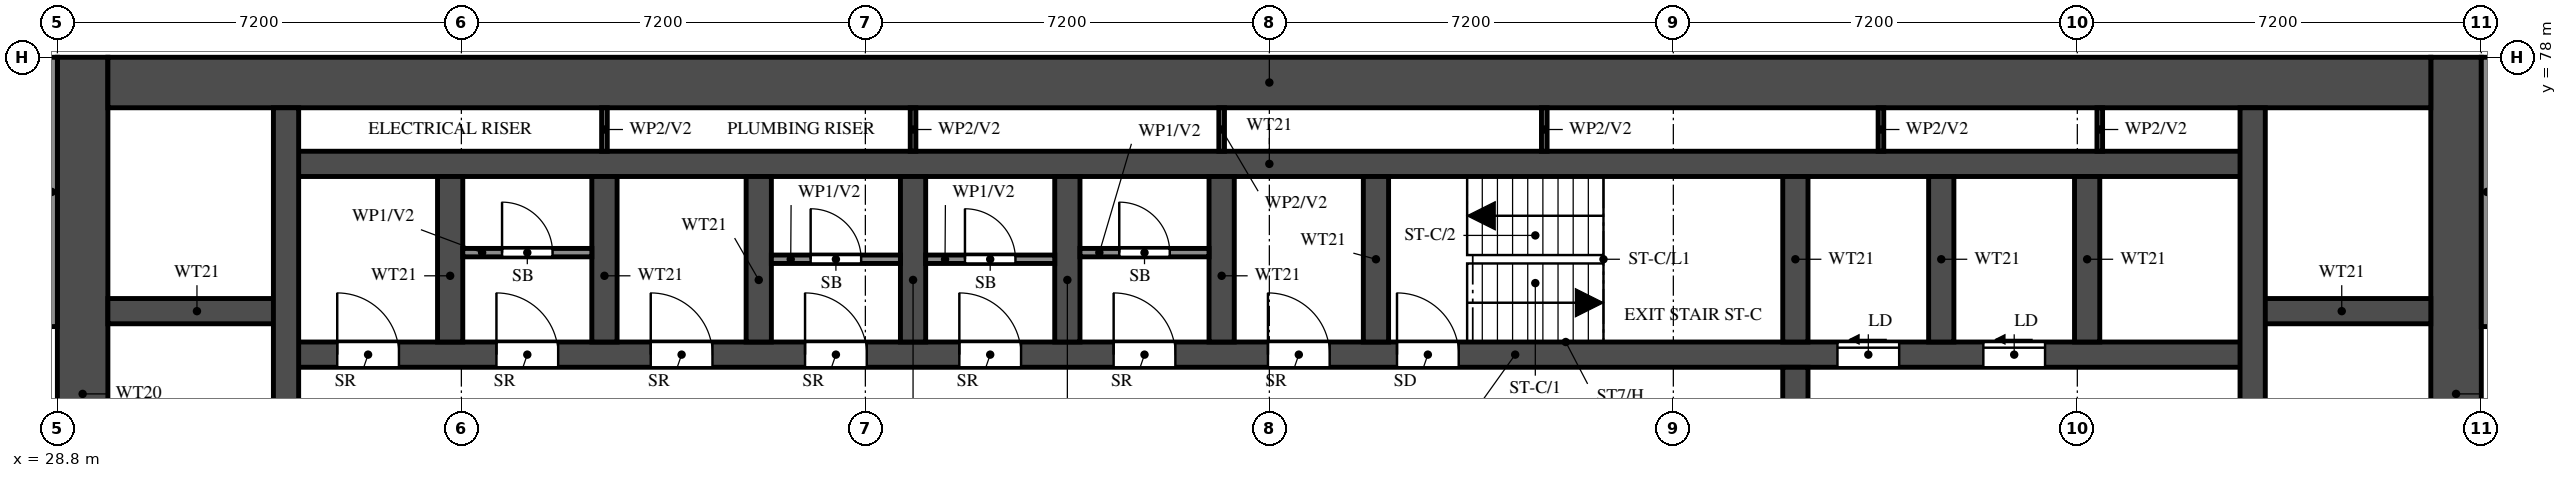
"""IFC4 building model, lengths in metres.
Left out: names, types, materials, properties, quantities, classifications, styles, units other than length and angle.
Written with IfcOpenShell. Run it as: python <this file> out.ifc"""

import sys

from ifc_helpers import new_model, si_unit, direction, frame, frame_2d, origin, place, context, subcontext, project, spatial, rectangle, extrude, element, fill, save


model = new_model("IFC4")
c1 = context("Model", 3, precision=1e-05, world=origin(), true_north=direction((0.0, 1.0)))
c2 = subcontext(c1, "Body", "Model", "MODEL_VIEW")
j1 = project(units=[si_unit("LENGTHUNIT", "METRE"), si_unit("PLANEANGLEUNIT", "RADIAN")], contexts=[c1])
p1 = place(None, origin())
s1 = spatial("IfcSite", under=j1, at=p1, CompositionType="ELEMENT")
p2 = place(p1, origin())
s2 = spatial("IfcBuilding", under=s1, at=p2, CompositionType="ELEMENT")
p3 = place(p2, frame((0.0, 0.0, 37.5)))
s3 = spatial("IfcBuildingStorey", under=s2, at=p3, CompositionType="ELEMENT", Elevation=37.5)
for number, where, z_axis, x_axis in (
    (1, (29.25, 66.0, 0.0), (0.0, 0.0, 1.0), (0.0, 1.0, 0.0)),
    (2, (71.55, 66.0, 0.0), (0.0, 0.0, 1.0), (0.0, 1.0, 0.0)),
):
    element("IfcWall", number, at=place(p3, frame(where, z_axis=z_axis, x_axis=x_axis)), inside=s3, PredefinedType="SHEAR", context=c2, shape_type="SweptSolid", body=[
        extrude(rectangle(XDim=12.0, YDim=0.9, at=frame_2d((6.0, 0.0))), origin(), (0.0, 0.0, 1.0), 3.18),
    ])
p4 = place(p3, frame((29.7, 77.55, 0.0), z_axis=(0.0, 0.0, 1.0), x_axis=(1.0, 0.0, 0.0)))
e3 = element("IfcWall", 3, at=p4, inside=s3, PredefinedType="SHEAR", context=c2, shape_type="SweptSolid", body=[
    extrude(rectangle(XDim=41.4, YDim=0.9, at=frame_2d((20.7, 0.0))), origin(), (0.0, 0.0, 1.0), 3.18),
])
p5 = place(p3, frame((32.875, 72.7, 0.0), z_axis=(0.0, 0.0, 1.0), x_axis=(1.0, 0.0, 0.0)))
e4 = element("IfcWall", 4, at=p5, inside=s3, PredefinedType="SHEAR", context=c2, shape_type="SweptSolid", body=[
    extrude(rectangle(XDim=35.05, YDim=0.45, at=frame_2d((17.525, 0.0))), origin(), (0.0, 0.0, 1.0), 3.18),
])
p6 = place(p5, frame((19.8, 0.0, 0.0)))
e5 = element("IfcOpeningElement", 5, at=p6, cuts=e4, PredefinedType="OPENING", context=c2, shape_type="SweptSolid", body=[
    extrude(rectangle(XDim=1.1, YDim=2.1, at=frame_2d((0.55, 1.05))), frame((0.0, 0.235, 0.0), z_axis=(0.0, -1.0, 0.0), x_axis=(1.0, 0.0, 0.0)), (0.0, 0.0, 1.0), 0.47),
])
p7 = place(p5, frame((27.65, 0.0, 0.0)))
e6 = element("IfcOpeningElement", 6, at=p7, cuts=e4, PredefinedType="OPENING", context=c2, shape_type="SweptSolid", body=[
    extrude(rectangle(XDim=1.1, YDim=2.1, at=frame_2d((0.55, 1.05))), frame((0.0, 0.235, 0.0), z_axis=(0.0, -1.0, 0.0), x_axis=(1.0, 0.0, 0.0)), (0.0, 0.0, 1.0), 0.47),
])
p8 = place(p5, frame((30.25, 0.0, 0.0)))
e7 = element("IfcOpeningElement", 7, at=p8, cuts=e4, PredefinedType="OPENING", context=c2, shape_type="SweptSolid", body=[
    extrude(rectangle(XDim=1.1, YDim=2.1, at=frame_2d((0.55, 1.05))), frame((0.0, 0.235, 0.0), z_axis=(0.0, -1.0, 0.0), x_axis=(1.0, 0.0, 0.0)), (0.0, 0.0, 1.0), 0.47),
])
p9 = place(p5, frame((3.75, 0.0, 0.0)))
e8 = element("IfcOpeningElement", 8, at=p9, cuts=e4, PredefinedType="OPENING", context=c2, shape_type="SweptSolid", body=[
    extrude(rectangle(XDim=1.1, YDim=2.1, at=frame_2d((0.55, 1.05))), frame((0.0, 0.235, 0.0), z_axis=(0.0, -1.0, 0.0), x_axis=(1.0, 0.0, 0.0)), (0.0, 0.0, 1.0), 0.47),
])
p10 = place(p5, frame((6.5, 0.0, 0.0)))
e9 = element("IfcOpeningElement", 9, at=p10, cuts=e4, PredefinedType="OPENING", context=c2, shape_type="SweptSolid", body=[
    extrude(rectangle(XDim=1.1, YDim=2.1, at=frame_2d((0.55, 1.05))), frame((0.0, 0.235, 0.0), z_axis=(0.0, -1.0, 0.0), x_axis=(1.0, 0.0, 0.0)), (0.0, 0.0, 1.0), 0.47),
])
p11 = place(p5, frame((9.25, 0.0, 0.0)))
e10 = element("IfcOpeningElement", 10, at=p11, cuts=e4, PredefinedType="OPENING", context=c2, shape_type="SweptSolid", body=[
    extrude(rectangle(XDim=1.1, YDim=2.1, at=frame_2d((0.55, 1.05))), frame((0.0, 0.235, 0.0), z_axis=(0.0, -1.0, 0.0), x_axis=(1.0, 0.0, 0.0)), (0.0, 0.0, 1.0), 0.47),
])
p12 = place(p5, frame((12.0, 0.0, 0.0)))
e11 = element("IfcOpeningElement", 11, at=p12, cuts=e4, PredefinedType="OPENING", context=c2, shape_type="SweptSolid", body=[
    extrude(rectangle(XDim=1.1, YDim=2.1, at=frame_2d((0.55, 1.05))), frame((0.0, 0.235, 0.0), z_axis=(0.0, -1.0, 0.0), x_axis=(1.0, 0.0, 0.0)), (0.0, 0.0, 1.0), 0.47),
])
p13 = place(p5, frame((14.75, 0.0, 0.0)))
e12 = element("IfcOpeningElement", 12, at=p13, cuts=e4, PredefinedType="OPENING", context=c2, shape_type="SweptSolid", body=[
    extrude(rectangle(XDim=1.1, YDim=2.1, at=frame_2d((0.55, 1.05))), frame((0.0, 0.235, 0.0), z_axis=(0.0, -1.0, 0.0), x_axis=(1.0, 0.0, 0.0)), (0.0, 0.0, 1.0), 0.47),
])
p14 = place(p5, frame((17.5, 0.0, 0.0)))
e13 = element("IfcOpeningElement", 13, at=p14, cuts=e4, PredefinedType="OPENING", context=c2, shape_type="SweptSolid", body=[
    extrude(rectangle(XDim=1.1, YDim=2.1, at=frame_2d((0.55, 1.05))), frame((0.0, 0.235, 0.0), z_axis=(0.0, -1.0, 0.0), x_axis=(1.0, 0.0, 0.0)), (0.0, 0.0, 1.0), 0.47),
])
p15 = place(p5, frame((0.913, 0.0, 0.0)))
e14 = element("IfcOpeningElement", 14, at=p15, cuts=e4, PredefinedType="OPENING", context=c2, shape_type="SweptSolid", body=[
    extrude(rectangle(XDim=1.1, YDim=2.1, at=frame_2d((0.55, 1.05))), frame((0.0, 0.235, 0.0), z_axis=(0.0, -1.0, 0.0), x_axis=(1.0, 0.0, 0.0)), (0.0, 0.0, 1.0), 0.47),
])
p16 = place(p3, frame((32.875, 76.1, 0.0), z_axis=(0.0, 0.0, 1.0), x_axis=(1.0, 0.0, 0.0)))
e15 = element("IfcWall", 15, at=p16, inside=s3, PredefinedType="SHEAR", context=c2, shape_type="SweptSolid", body=[
    extrude(rectangle(XDim=35.05, YDim=0.45, at=frame_2d((17.525, 0.0))), origin(), (0.0, 0.0, 1.0), 3.18),
])
for number, where, z_axis, x_axis in (
    (16, (29.7, 73.475, 0.0), (0.0, 0.0, 1.0), (1.0, 0.0, 0.0)),
    (17, (67.925, 73.475, 0.0), (0.0, 0.0, 1.0), (1.0, 0.0, 0.0)),
):
    element("IfcWall", number, at=place(p3, frame(where, z_axis=z_axis, x_axis=x_axis)), inside=s3, PredefinedType="SHEAR", context=c2, shape_type="SweptSolid", body=[
        extrude(rectangle(XDim=3.175, YDim=0.45, at=frame_2d((1.587, 0.0))), origin(), (0.0, 0.0, 1.0), 3.18),
    ])
p17 = place(p3, frame((32.875, 66.45, 0.0), z_axis=(0.0, 0.0, 1.0), x_axis=(0.0, 1.0, 0.0)))
e18 = element("IfcWall", 18, at=p17, inside=s3, PredefinedType="SHEAR", context=c2, shape_type="SweptSolid", body=[
    extrude(rectangle(XDim=10.65, YDim=0.45, at=frame_2d((5.325, 0.0))), origin(), (0.0, 0.0, 1.0), 3.18),
])
p18 = place(p3, frame((67.925, 66.45, 0.0), z_axis=(0.0, 0.0, 1.0), x_axis=(0.0, 1.0, 0.0)))
e19 = element("IfcWall", 19, at=p18, inside=s3, PredefinedType="SHEAR", context=c2, shape_type="SweptSolid", body=[
    extrude(rectangle(XDim=10.65, YDim=0.45, at=frame_2d((5.325, 0.0))), origin(), (0.0, 0.0, 1.0), 3.18),
])
p19 = place(p18, frame((0.15, 0.0, 0.0)))
e20 = element("IfcOpeningElement", 20, at=p19, cuts=e19, PredefinedType="OPENING", context=c2, shape_type="SweptSolid", body=[
    extrude(rectangle(XDim=1.1, YDim=2.1, at=frame_2d((0.55, 1.05))), frame((0.0, 0.235, 0.0), z_axis=(0.0, -1.0, 0.0), x_axis=(1.0, 0.0, 0.0)), (0.0, 0.0, 1.0), 0.47),
])
p20 = place(p3, frame((59.775, 66.45, 0.0), z_axis=(0.0, 0.0, 1.0), x_axis=(0.0, 1.0, 0.0)))
e21 = element("IfcWall", 21, at=p20, inside=s3, PredefinedType="SHEAR", context=c2, shape_type="SweptSolid", body=[
    extrude(rectangle(XDim=6.025, YDim=0.45, at=frame_2d((3.013, 0.0))), origin(), (0.0, 0.0, 1.0), 3.18),
])
p21 = place(p20, frame((3.85, 0.0, 0.0)))
e22 = element("IfcOpeningElement", 22, at=p21, cuts=e21, PredefinedType="OPENING", context=c2, shape_type="SweptSolid", body=[
    extrude(rectangle(XDim=1.2, YDim=2.1, at=frame_2d((0.6, 1.05))), frame((0.0, 0.235, 0.0), z_axis=(0.0, -1.0, 0.0), x_axis=(1.0, 0.0, 0.0)), (0.0, 0.0, 1.0), 0.47),
])
for number, where, z_axis, x_axis in (
    (23, (59.775, 72.925, 0.0), (0.0, 0.0, 1.0), (0.0, 1.0, 0.0)),
    (24, (35.8, 72.925, 0.0), (0.0, 0.0, 1.0), (0.0, 1.0, 0.0)),
    (25, (38.55, 72.925, 0.0), (0.0, 0.0, 1.0), (0.0, 1.0, 0.0)),
    (26, (41.3, 72.925, 0.0), (0.0, 0.0, 1.0), (0.0, 1.0, 0.0)),
    (27, (44.05, 72.925, 0.0), (0.0, 0.0, 1.0), (0.0, 1.0, 0.0)),
    (28, (46.8, 72.925, 0.0), (0.0, 0.0, 1.0), (0.0, 1.0, 0.0)),
    (29, (49.55, 72.925, 0.0), (0.0, 0.0, 1.0), (0.0, 1.0, 0.0)),
    (30, (52.3, 72.925, 0.0), (0.0, 0.0, 1.0), (0.0, 1.0, 0.0)),
    (31, (62.375, 72.925, 0.0), (0.0, 0.0, 1.0), (0.0, 1.0, 0.0)),
    (32, (64.975, 72.925, 0.0), (0.0, 0.0, 1.0), (0.0, 1.0, 0.0)),
):
    element("IfcWall", number, at=place(p3, frame(where, z_axis=z_axis, x_axis=x_axis)), inside=s3, PredefinedType="SHEAR", context=c2, shape_type="SweptSolid", body=[
        extrude(rectangle(XDim=2.95, YDim=0.45, at=frame_2d((1.475, 0.0))), origin(), (0.0, 0.0, 1.0), 3.18),
    ])
p22 = place(p3, frame((36.025, 74.518, 0.0), z_axis=(0.0, 0.0, 1.0), x_axis=(1.0, 0.0, 0.0)))
e33 = element("IfcWall", 33, at=p22, inside=s3, PredefinedType="PARTITIONING", context=c2, shape_type="SweptSolid", body=[
    extrude(rectangle(XDim=2.3, YDim=0.15, at=frame_2d((1.15, 0.0))), origin(), (0.0, 0.0, 1.0), 3.18),
])
p23 = place(p22, frame((0.7, 0.0, 0.0)))
e34 = element("IfcOpeningElement", 34, at=p23, cuts=e33, PredefinedType="OPENING", context=c2, shape_type="SweptSolid", body=[
    extrude(rectangle(XDim=0.9, YDim=2.1, at=frame_2d((0.45, 1.05))), frame((0.0, 0.085, 0.0), z_axis=(0.0, -1.0, 0.0), x_axis=(1.0, 0.0, 0.0)), (0.0, 0.0, 1.0), 0.17),
])
p24 = place(p3, frame((41.525, 74.4, 0.0), z_axis=(0.0, 0.0, 1.0), x_axis=(1.0, 0.0, 0.0)))
e35 = element("IfcWall", 35, at=p24, inside=s3, PredefinedType="PARTITIONING", context=c2, shape_type="SweptSolid", body=[
    extrude(rectangle(XDim=2.3, YDim=0.15, at=frame_2d((1.15, 0.0))), origin(), (0.0, 0.0, 1.0), 3.18),
])
p25 = place(p24, frame((0.7, 0.0, 0.0)))
e36 = element("IfcOpeningElement", 36, at=p25, cuts=e35, PredefinedType="OPENING", context=c2, shape_type="SweptSolid", body=[
    extrude(rectangle(XDim=0.9, YDim=2.1, at=frame_2d((0.45, 1.05))), frame((0.0, 0.085, 0.0), z_axis=(0.0, -1.0, 0.0), x_axis=(1.0, 0.0, 0.0)), (0.0, 0.0, 1.0), 0.17),
])
p26 = place(p3, frame((44.275, 74.4, 0.0), z_axis=(0.0, 0.0, 1.0), x_axis=(1.0, 0.0, 0.0)))
e37 = element("IfcWall", 37, at=p26, inside=s3, PredefinedType="PARTITIONING", context=c2, shape_type="SweptSolid", body=[
    extrude(rectangle(XDim=2.3, YDim=0.15, at=frame_2d((1.15, 0.0))), origin(), (0.0, 0.0, 1.0), 3.18),
])
p27 = place(p26, frame((0.7, 0.0, 0.0)))
e38 = element("IfcOpeningElement", 38, at=p27, cuts=e37, PredefinedType="OPENING", context=c2, shape_type="SweptSolid", body=[
    extrude(rectangle(XDim=0.9, YDim=2.1, at=frame_2d((0.45, 1.05))), frame((0.0, 0.085, 0.0), z_axis=(0.0, -1.0, 0.0), x_axis=(1.0, 0.0, 0.0)), (0.0, 0.0, 1.0), 0.17),
])
p28 = place(p3, frame((47.025, 74.518, 0.0), z_axis=(0.0, 0.0, 1.0), x_axis=(1.0, 0.0, 0.0)))
e39 = element("IfcWall", 39, at=p28, inside=s3, PredefinedType="PARTITIONING", context=c2, shape_type="SweptSolid", body=[
    extrude(rectangle(XDim=2.3, YDim=0.15, at=frame_2d((1.15, 0.0))), origin(), (0.0, 0.0, 1.0), 3.18),
])
p29 = place(p28, frame((0.7, 0.0, 0.0)))
e40 = element("IfcOpeningElement", 40, at=p29, cuts=e39, PredefinedType="OPENING", context=c2, shape_type="SweptSolid", body=[
    extrude(rectangle(XDim=0.9, YDim=2.1, at=frame_2d((0.45, 1.05))), frame((0.0, 0.085, 0.0), z_axis=(0.0, -1.0, 0.0), x_axis=(1.0, 0.0, 0.0)), (0.0, 0.0, 1.0), 0.17),
])
for number, where, z_axis, x_axis in (
    (41, (38.55, 76.325, 0.0), (0.0, 0.0, 1.0), (0.0, 1.0, 0.0)),
    (42, (44.05, 76.325, 0.0), (0.0, 0.0, 1.0), (0.0, 1.0, 0.0)),
    (43, (49.55, 76.325, 0.0), (0.0, 0.0, 1.0), (0.0, 1.0, 0.0)),
    (44, (55.3, 76.325, 0.0), (0.0, 0.0, 1.0), (0.0, 1.0, 0.0)),
    (45, (61.3, 76.325, 0.0), (0.0, 0.0, 1.0), (0.0, 1.0, 0.0)),
    (46, (65.2, 76.325, 0.0), (0.0, 0.0, 1.0), (0.0, 1.0, 0.0)),
):
    element("IfcWall", number, at=place(p3, frame(where, z_axis=z_axis, x_axis=x_axis)), inside=s3, PredefinedType="PARTITIONING", context=c2, shape_type="SweptSolid", body=[
        extrude(rectangle(XDim=0.775, YDim=0.1, at=frame_2d((0.388, 0.0))), origin(), (0.0, 0.0, 1.0), 3.18),
    ])
for number, where, z_axis, x_axis in (
    (47, (28.7, 73.2, 0.0), (0.0, 0.0, 1.0), (0.0, 1.0, 0.0)),
    (48, (72.1, 73.2, 0.0), (0.0, 0.0, 1.0), (0.0, 1.0, 0.0)),
):
    element("IfcWall", number, at=place(p3, frame(where, z_axis=z_axis, x_axis=x_axis)), inside=s3, PredefinedType="SOLIDWALL", context=c2, shape_type="SweptSolid", body=[
        extrude(rectangle(XDim=4.8, YDim=0.2, at=frame_2d((2.4, 0.0))), origin(), (0.0, 0.0, 1.0), 3.18),
    ])
p30 = place(p6, origin())
e49 = element("IfcDoor", 49, at=p30, inside=s3, OperationType="SINGLE_SWING_LEFT", PredefinedType="DOOR", context=c2, shape_type="SweptSolid", body=[
    extrude(rectangle(XDim=1.1, YDim=2.1, at=frame_2d((0.55, 1.05))), frame((0.0, 0.025, 0.0), z_axis=(0.0, -1.0, 0.0), x_axis=(1.0, 0.0, 0.0)), (0.0, 0.0, 1.0), 0.05),
])
fill(e5, e49)
p31 = place(p7, origin())
e50 = element("IfcDoor", 50, at=p31, inside=s3, OperationType="SLIDING_TO_LEFT", PredefinedType="DOOR", context=c2, shape_type="SweptSolid", body=[
    extrude(rectangle(XDim=1.1, YDim=2.1, at=frame_2d((0.55, 1.05))), frame((0.0, 0.025, 0.0), z_axis=(0.0, -1.0, 0.0), x_axis=(1.0, 0.0, 0.0)), (0.0, 0.0, 1.0), 0.05),
])
fill(e6, e50)
p32 = place(p8, origin())
e51 = element("IfcDoor", 51, at=p32, inside=s3, OperationType="SLIDING_TO_LEFT", PredefinedType="DOOR", context=c2, shape_type="SweptSolid", body=[
    extrude(rectangle(XDim=1.1, YDim=2.1, at=frame_2d((0.55, 1.05))), frame((0.0, 0.025, 0.0), z_axis=(0.0, -1.0, 0.0), x_axis=(1.0, 0.0, 0.0)), (0.0, 0.0, 1.0), 0.05),
])
fill(e7, e51)
p33 = place(p9, origin())
e52 = element("IfcDoor", 52, at=p33, inside=s3, OperationType="SINGLE_SWING_LEFT", PredefinedType="DOOR", context=c2, shape_type="SweptSolid", body=[
    extrude(rectangle(XDim=1.1, YDim=2.1, at=frame_2d((0.55, 1.05))), frame((0.0, 0.025, 0.0), z_axis=(0.0, -1.0, 0.0), x_axis=(1.0, 0.0, 0.0)), (0.0, 0.0, 1.0), 0.05),
])
fill(e8, e52)
p34 = place(p23, origin())
e53 = element("IfcDoor", 53, at=p34, inside=s3, OperationType="SINGLE_SWING_RIGHT", PredefinedType="DOOR", context=c2, shape_type="SweptSolid", body=[
    extrude(rectangle(XDim=0.9, YDim=2.1, at=frame_2d((0.45, 1.05))), frame((0.0, 0.025, 0.0), z_axis=(0.0, -1.0, 0.0), x_axis=(1.0, 0.0, 0.0)), (0.0, 0.0, 1.0), 0.05),
])
fill(e34, e53)
p35 = place(p10, origin())
e54 = element("IfcDoor", 54, at=p35, inside=s3, OperationType="SINGLE_SWING_LEFT", PredefinedType="DOOR", context=c2, shape_type="SweptSolid", body=[
    extrude(rectangle(XDim=1.1, YDim=2.1, at=frame_2d((0.55, 1.05))), frame((0.0, 0.025, 0.0), z_axis=(0.0, -1.0, 0.0), x_axis=(1.0, 0.0, 0.0)), (0.0, 0.0, 1.0), 0.05),
])
fill(e9, e54)
p36 = place(p11, origin())
e55 = element("IfcDoor", 55, at=p36, inside=s3, OperationType="SINGLE_SWING_LEFT", PredefinedType="DOOR", context=c2, shape_type="SweptSolid", body=[
    extrude(rectangle(XDim=1.1, YDim=2.1, at=frame_2d((0.55, 1.05))), frame((0.0, 0.025, 0.0), z_axis=(0.0, -1.0, 0.0), x_axis=(1.0, 0.0, 0.0)), (0.0, 0.0, 1.0), 0.05),
])
fill(e10, e55)
p37 = place(p25, origin())
e56 = element("IfcDoor", 56, at=p37, inside=s3, OperationType="SINGLE_SWING_LEFT", PredefinedType="DOOR", context=c2, shape_type="SweptSolid", body=[
    extrude(rectangle(XDim=0.9, YDim=2.1, at=frame_2d((0.45, 1.05))), frame((0.0, 0.025, 0.0), z_axis=(0.0, -1.0, 0.0), x_axis=(1.0, 0.0, 0.0)), (0.0, 0.0, 1.0), 0.05),
])
fill(e36, e56)
p38 = place(p12, origin())
e57 = element("IfcDoor", 57, at=p38, inside=s3, OperationType="SINGLE_SWING_LEFT", PredefinedType="DOOR", context=c2, shape_type="SweptSolid", body=[
    extrude(rectangle(XDim=1.1, YDim=2.1, at=frame_2d((0.55, 1.05))), frame((0.0, 0.025, 0.0), z_axis=(0.0, -1.0, 0.0), x_axis=(1.0, 0.0, 0.0)), (0.0, 0.0, 1.0), 0.05),
])
fill(e11, e57)
p39 = place(p27, origin())
e58 = element("IfcDoor", 58, at=p39, inside=s3, OperationType="SINGLE_SWING_RIGHT", PredefinedType="DOOR", context=c2, shape_type="SweptSolid", body=[
    extrude(rectangle(XDim=0.9, YDim=2.1, at=frame_2d((0.45, 1.05))), frame((0.0, 0.025, 0.0), z_axis=(0.0, -1.0, 0.0), x_axis=(1.0, 0.0, 0.0)), (0.0, 0.0, 1.0), 0.05),
])
fill(e38, e58)
p40 = place(p13, origin())
e59 = element("IfcDoor", 59, at=p40, inside=s3, OperationType="SINGLE_SWING_LEFT", PredefinedType="DOOR", context=c2, shape_type="SweptSolid", body=[
    extrude(rectangle(XDim=1.1, YDim=2.1, at=frame_2d((0.55, 1.05))), frame((0.0, 0.025, 0.0), z_axis=(0.0, -1.0, 0.0), x_axis=(1.0, 0.0, 0.0)), (0.0, 0.0, 1.0), 0.05),
])
fill(e12, e59)
p41 = place(p29, origin())
e60 = element("IfcDoor", 60, at=p41, inside=s3, OperationType="SINGLE_SWING_RIGHT", PredefinedType="DOOR", context=c2, shape_type="SweptSolid", body=[
    extrude(rectangle(XDim=0.9, YDim=2.1, at=frame_2d((0.45, 1.05))), frame((0.0, 0.025, 0.0), z_axis=(0.0, -1.0, 0.0), x_axis=(1.0, 0.0, 0.0)), (0.0, 0.0, 1.0), 0.05),
])
fill(e40, e60)
p42 = place(p14, origin())
e61 = element("IfcDoor", 61, at=p42, inside=s3, OperationType="SINGLE_SWING_LEFT", PredefinedType="DOOR", context=c2, shape_type="SweptSolid", body=[
    extrude(rectangle(XDim=1.1, YDim=2.1, at=frame_2d((0.55, 1.05))), frame((0.0, 0.025, 0.0), z_axis=(0.0, -1.0, 0.0), x_axis=(1.0, 0.0, 0.0)), (0.0, 0.0, 1.0), 0.05),
])
fill(e13, e61)
p43 = place(p15, origin())
e62 = element("IfcDoor", 62, at=p43, inside=s3, OperationType="SINGLE_SWING_LEFT", PredefinedType="DOOR", context=c2, shape_type="SweptSolid", body=[
    extrude(rectangle(XDim=1.1, YDim=2.1, at=frame_2d((0.55, 1.05))), frame((0.0, 0.025, 0.0), z_axis=(0.0, -1.0, 0.0), x_axis=(1.0, 0.0, 0.0)), (0.0, 0.0, 1.0), 0.05),
])
fill(e14, e62)
save(model, sys.argv[1])
